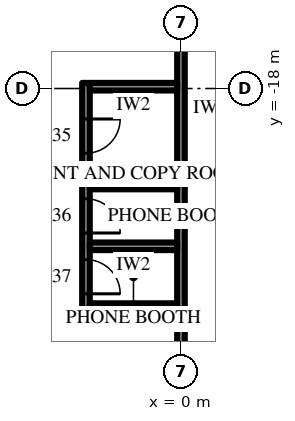
"""IFC4 building model, lengths in metres.
Left out: names, types, materials, properties, quantities, classifications, styles, units other than length and angle.
Written with IfcOpenShell. Run it as: python <this file> out.ifc"""

import sys

from ifc_helpers import new_model, si_unit, direction, frame, frame_2d, origin, place, context, subcontext, project, spatial, rectangle, extrude, element, fill, save


model = new_model("IFC4")
c1 = context("Model", 3, precision=1e-05, world=origin(), true_north=direction((0.0, 1.0)))
c2 = subcontext(c1, "Body", "Model", "MODEL_VIEW")
j1 = project(units=[si_unit("LENGTHUNIT", "METRE"), si_unit("PLANEANGLEUNIT", "RADIAN")], contexts=[c1])
p1 = place(None, origin())
s1 = spatial("IfcSite", under=j1, at=p1, CompositionType="ELEMENT")
p2 = place(p1, origin())
s2 = spatial("IfcBuilding", under=s1, at=p2, CompositionType="ELEMENT")
p3 = place(p2, frame((0.0, 0.0, 274.3)))
s3 = spatial("IfcBuildingStorey", under=s2, at=p3, CompositionType="ELEMENT", Elevation=274.3)
p4 = place(p3, frame((0.0, -12.3, 0.0), z_axis=(0.0, 0.0, 1.0), x_axis=(0.0, -1.0, 0.0)))
e1 = element("IfcWall", 1, at=p4, inside=s3, PredefinedType="PARTITIONING", context=c2, shape_type="SweptSolid", body=[
    extrude(rectangle(XDim=15.55, YDim=0.2, at=frame_2d((7.775, 0.0))), origin(), (0.0, 0.0, 1.0), 2.992),
])
p5 = place(p4, frame((1.055, 0.0, 0.0)))
e2 = element("IfcOpeningElement", 2, at=p5, cuts=e1, PredefinedType="OPENING", context=c2, shape_type="SweptSolid", body=[
    extrude(rectangle(XDim=1.0, YDim=2.2, at=frame_2d((0.5, 1.1))), frame((0.0, 0.11, 0.0), z_axis=(0.0, -1.0, 0.0), x_axis=(1.0, 0.0, 0.0)), (0.0, 0.0, 1.0), 0.22),
])
p6 = place(p3, frame((-2.5, -17.853, 0.0), z_axis=(0.0, 0.0, 1.0), x_axis=(0.0, -1.0, 0.0)))
e3 = element("IfcWall", 3, at=p6, inside=s3, PredefinedType="PARTITIONING", context=c2, shape_type="SweptSolid", body=[
    extrude(rectangle(XDim=6.0, YDim=0.2, at=frame_2d((3.0, 0.0))), origin(), (0.0, 0.0, 1.0), 4.0),
])
p7 = place(p6, frame((0.95, 0.0, 0.0)))
e4 = element("IfcOpeningElement", 4, at=p7, cuts=e3, PredefinedType="OPENING", context=c2, shape_type="SweptSolid", body=[
    extrude(rectangle(XDim=0.9, YDim=2.2, at=frame_2d((0.45, 1.1))), frame((0.0, 0.11, 0.0), z_axis=(0.0, -1.0, 0.0), x_axis=(1.0, 0.0, 0.0)), (0.0, 0.0, 1.0), 0.22),
])
p8 = place(p6, frame((3.05, 0.0, 0.0)))
e5 = element("IfcOpeningElement", 5, at=p8, cuts=e3, PredefinedType="OPENING", context=c2, shape_type="SweptSolid", body=[
    extrude(rectangle(XDim=0.9, YDim=2.2, at=frame_2d((0.45, 1.1))), frame((0.0, 0.11, 0.0), z_axis=(0.0, -1.0, 0.0), x_axis=(1.0, 0.0, 0.0)), (0.0, 0.0, 1.0), 0.22),
])
p9 = place(p6, frame((4.65, 0.0, 0.0)))
e6 = element("IfcOpeningElement", 6, at=p9, cuts=e3, PredefinedType="OPENING", context=c2, shape_type="SweptSolid", body=[
    extrude(rectangle(XDim=0.9, YDim=2.2, at=frame_2d((0.45, 1.1))), frame((0.0, 0.11, 0.0), z_axis=(0.0, -1.0, 0.0), x_axis=(1.0, 0.0, 0.0)), (0.0, 0.0, 1.0), 0.22),
])
for number, where, z_axis, x_axis in (
    (7, (-0.1, -17.952, 0.0), (0.0, 0.0, 1.0), (-1.0, 0.0, 0.0)),
    (8, (-0.1, -20.552, 0.0), (0.0, 0.0, 1.0), (-1.0, 0.0, 0.0)),
    (9, (-0.1, -22.153, 0.0), (0.0, 0.0, 1.0), (-1.0, 0.0, 0.0)),
    (10, (-0.1, -23.752, 0.0), (0.0, 0.0, 1.0), (-1.0, 0.0, 0.0)),
):
    element("IfcWall", number, at=place(p3, frame(where, z_axis=z_axis, x_axis=x_axis)), inside=s3, PredefinedType="PARTITIONING", context=c2, shape_type="SweptSolid", body=[
        extrude(rectangle(XDim=2.3, YDim=0.2, at=frame_2d((1.15, 0.0))), origin(), (0.0, 0.0, 1.0), 4.0),
    ])
p10 = place(p7, origin())
e11 = element("IfcDoor", 11, at=p10, inside=s3, OperationType="SINGLE_SWING_RIGHT", PredefinedType="DOOR", context=c2, shape_type="SweptSolid", body=[
    extrude(rectangle(XDim=0.9, YDim=2.2, at=frame_2d((0.45, 1.1))), frame((0.0, 0.025, 0.0), z_axis=(0.0, -1.0, 0.0), x_axis=(1.0, 0.0, 0.0)), (0.0, 0.0, 1.0), 0.05),
])
fill(e4, e11)
p11 = place(p8, origin())
e12 = element("IfcDoor", 12, at=p11, inside=s3, OperationType="SINGLE_SWING_LEFT", PredefinedType="DOOR", context=c2, shape_type="SweptSolid", body=[
    extrude(rectangle(XDim=0.9, YDim=2.2, at=frame_2d((0.45, 1.1))), frame((0.0, 0.025, 0.0), z_axis=(0.0, -1.0, 0.0), x_axis=(1.0, 0.0, 0.0)), (0.0, 0.0, 1.0), 0.05),
])
fill(e5, e12)
p12 = place(p9, origin())
e13 = element("IfcDoor", 13, at=p12, inside=s3, OperationType="SINGLE_SWING_LEFT", PredefinedType="DOOR", context=c2, shape_type="SweptSolid", body=[
    extrude(rectangle(XDim=0.9, YDim=2.2, at=frame_2d((0.45, 1.1))), frame((0.0, 0.025, 0.0), z_axis=(0.0, -1.0, 0.0), x_axis=(1.0, 0.0, 0.0)), (0.0, 0.0, 1.0), 0.05),
])
fill(e6, e13)
save(model, sys.argv[1])
